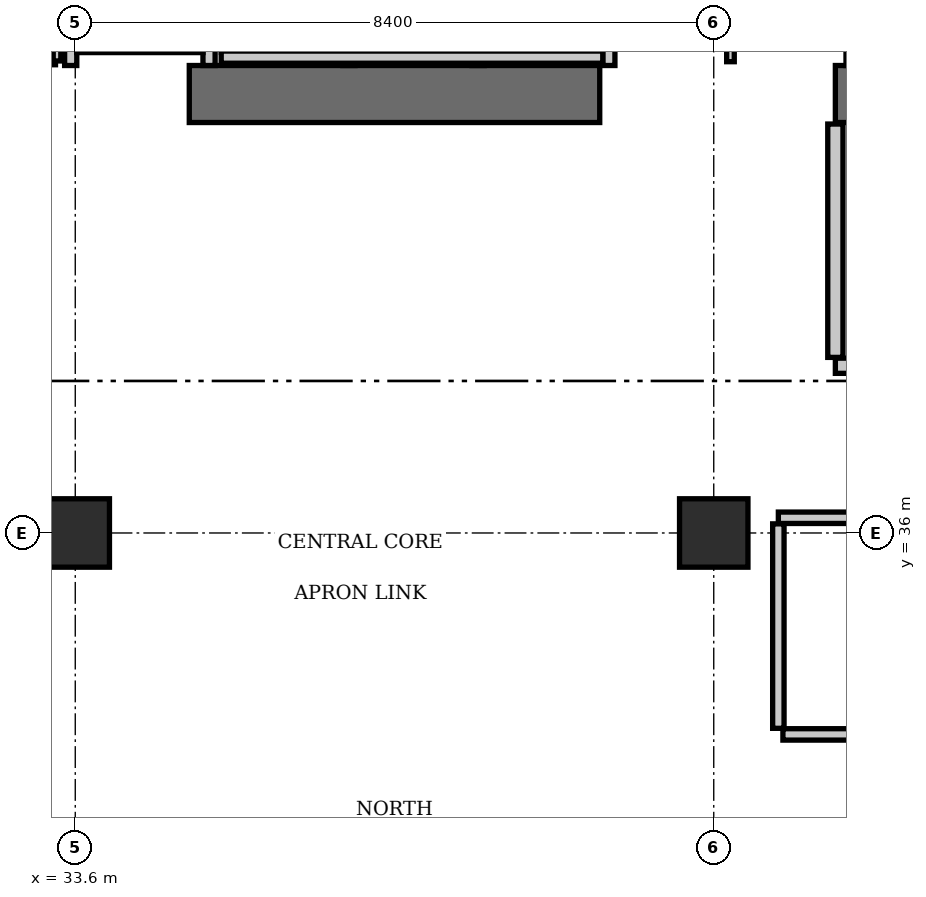
"""IFC4 building model, lengths in metres.
Left out: names, types, materials, properties, quantities, classifications, styles, units other than length and angle.
Written with IfcOpenShell. Run it as: python <this file> out.ifc"""

import sys

from ifc_helpers import new_model, si_unit, direction, frame, frame_2d, origin, origin_2d, place, context, subcontext, project, spatial, rectangle, extrude, element, save


model = new_model("IFC4")
c1 = context("Model", 3, precision=1e-05, world=origin(), true_north=direction((0.0, 1.0)))
c2 = subcontext(c1, "Body", "Model", "MODEL_VIEW")
j1 = project(units=[si_unit("LENGTHUNIT", "METRE"), si_unit("PLANEANGLEUNIT", "RADIAN")], contexts=[c1])
p1 = place(None, origin())
s1 = spatial("IfcSite", under=j1, at=p1, CompositionType="ELEMENT")
p2 = place(p1, origin())
s2 = spatial("IfcBuilding", under=s1, at=p2, CompositionType="ELEMENT")
p3 = place(p2, frame((0.0, 0.0, 165.9)))
s3 = spatial("IfcBuildingStorey", under=s2, at=p3, CompositionType="ELEMENT", Elevation=165.9)
p4 = place(p3, frame((35.1, 41.775, 0.0), z_axis=(0.0, 0.0, 1.0), x_axis=(1.0, 0.0, 0.0)))
e1 = element("IfcWall", 1, at=p4, inside=s3, PredefinedType="SHEAR", context=c2, shape_type="SweptSolid", body=[
    extrude(rectangle(XDim=5.4, YDim=0.75, at=frame_2d((2.7, 0.0))), origin(), (0.0, 0.0, 1.0), 3.85),
])
p5 = place(p3, frame((43.6, 41.775, 0.0), z_axis=(0.0, 0.0, 1.0), x_axis=(1.0, 0.0, 0.0)))
e2 = element("IfcWall", 2, at=p5, inside=s3, PredefinedType="SHEAR", context=c2, shape_type="SweptSolid", body=[
    extrude(rectangle(XDim=6.8, YDim=0.75, at=frame_2d((3.4, 0.0))), origin(), (0.0, 0.0, 1.0), 3.85),
])
p6 = place(p5, frame((3.9, 0.0, 0.0)))
e3 = element("IfcOpeningElement", 3, at=p6, cuts=e2, PredefinedType="OPENING", context=c2, shape_type="SweptSolid", body=[
    extrude(rectangle(XDim=1.15, YDim=2.15, at=frame_2d((0.575, 1.075))), frame((0.0, 0.385, 0.0), z_axis=(0.0, -1.0, 0.0), x_axis=(1.0, 0.0, 0.0)), (0.0, 0.0, 1.0), 0.77),
])
p7 = place(p5, frame((0.55, 0.0, 0.0)))
e4 = element("IfcOpeningElement", 4, at=p7, cuts=e2, PredefinedType="OPENING", context=c2, shape_type="SweptSolid", body=[
    extrude(rectangle(XDim=1.1, YDim=2.2, at=frame_2d((0.55, 1.1))), frame((0.0, 0.385, 0.0), z_axis=(0.0, -1.0, 0.0), x_axis=(1.0, 0.0, 0.0)), (0.0, 0.0, 1.0), 0.77),
])
for number, where, z_axis, x_axis in (
    (5, (33.6, 36.0, 0.0), (0.0, 0.0, 1.0), (1.0, 0.0, 0.0)),
    (6, (42.0, 36.0, 0.0), (0.0, 0.0, 1.0), (1.0, 0.0, 0.0)),
):
    element("IfcColumn", number, at=place(p3, frame(where, z_axis=z_axis, x_axis=x_axis)), inside=s3, PredefinedType="COLUMN", context=c2, shape_type="SweptSolid", body=[
        extrude(rectangle(XDim=0.9, YDim=0.9, at=origin_2d()), origin(), (0.0, 0.0, 1.0), 3.85),
    ])
p8 = place(p3, frame((43.82, 42.15, 0.0), z_axis=(0.0, 0.0, 1.0), x_axis=(0.0, 1.0, 0.0)))
e7 = element("IfcWall", 7, at=p8, inside=s3, PredefinedType="SOLIDWALL", context=c2, shape_type="SweptSolid", body=[
    extrude(rectangle(XDim=2.59, YDim=0.16, at=frame_2d((1.295, 0.0))), origin(), (0.0, 0.0, 1.0), 3.61),
])
for number, where, z_axis, x_axis in (
    (8, (37.2, 42.15, 0.0), (0.0, 0.0, 1.0), (0.0, 1.0, 0.0)),
    (9, (38.9, 42.15, 0.0), (0.0, 0.0, 1.0), (0.0, 1.0, 0.0)),
    (10, (40.62, 42.15, 0.0), (0.0, 0.0, 1.0), (0.0, 1.0, 0.0)),
):
    element("IfcWall", number, at=place(p3, frame(where, z_axis=z_axis, x_axis=x_axis)), inside=s3, PredefinedType="SOLIDWALL", context=c2, shape_type="SweptSolid", body=[
        extrude(rectangle(XDim=2.2, YDim=0.16, at=frame_2d((1.1, 0.0))), origin(), (0.0, 0.0, 1.0), 3.61),
    ])
p9 = place(p3, frame((35.52, 42.26, 0.0), z_axis=(0.0, 0.0, 1.0), x_axis=(1.0, 0.0, 0.0)))
e11 = element("IfcWall", 11, at=p9, inside=s3, PredefinedType="SOLIDWALL", context=c2, shape_type="SweptSolid", body=[
    extrude(rectangle(XDim=5.02, YDim=0.16, at=frame_2d((2.51, 0.0))), origin(), (0.0, 0.0, 1.0), 3.61),
])
for number, where, z_axis, x_axis in (
    (12, (33.54, 42.15, 0.0), (0.0, 0.0, 1.0), (0.0, 1.0, 0.0)),
    (13, (35.36, 42.15, 0.0), (0.0, 0.0, 1.0), (0.0, 1.0, 0.0)),
):
    element("IfcWall", number, at=place(p3, frame(where, z_axis=z_axis, x_axis=x_axis)), inside=s3, PredefinedType="SOLIDWALL", context=c2, shape_type="SweptSolid", body=[
        extrude(rectangle(XDim=2.25, YDim=0.16, at=frame_2d((1.125, 0.0))), origin(), (0.0, 0.0, 1.0), 3.61),
    ])
p10 = place(p3, frame((33.62, 42.4, 0.0), z_axis=(0.0, 0.0, 1.0), x_axis=(1.0, 0.0, 0.0)))
e14 = element("IfcWall", 14, at=p10, inside=s3, PredefinedType="SOLIDWALL", context=c2, shape_type="SweptSolid", body=[
    extrude(rectangle(XDim=1.66, YDim=0.16, at=frame_2d((0.83, 0.0))), origin(), (0.0, 0.0, 1.0), 3.61),
])
p11 = place(p3, frame((43.6, 38.2, 0.0), z_axis=(0.0, 0.0, 1.0), x_axis=(1.0, 0.0, 0.0)))
e15 = element("IfcWall", 15, at=p11, inside=s3, PredefinedType="PARTITIONING", context=c2, shape_type="SweptSolid", body=[
    extrude(rectangle(XDim=5.8, YDim=0.2, at=frame_2d((2.9, 0.0))), origin(), (0.0, 0.0, 1.0), 3.61),
])
p12 = place(p11, frame((2.3, 0.0, 0.0)))
e16 = element("IfcOpeningElement", 16, at=p12, cuts=e15, PredefinedType="OPENING", context=c2, shape_type="SweptSolid", body=[
    extrude(rectangle(XDim=1.15, YDim=2.15, at=frame_2d((0.575, 1.075))), frame((0.0, 0.11, 0.0), z_axis=(0.0, -1.0, 0.0), x_axis=(1.0, 0.0, 0.0)), (0.0, 0.0, 1.0), 0.22),
])
p13 = place(p3, frame((43.6, 38.31, 0.0), z_axis=(0.0, 0.0, 1.0), x_axis=(0.0, 1.0, 0.0)))
e17 = element("IfcWall", 17, at=p13, inside=s3, PredefinedType="PARTITIONING", context=c2, shape_type="SweptSolid", body=[
    extrude(rectangle(XDim=3.07, YDim=0.2, at=frame_2d((1.535, 0.0))), origin(), (0.0, 0.0, 1.0), 3.61),
])
p14 = place(p3, frame((32.02, 42.21, 0.0), z_axis=(0.0, 0.0, 1.0), x_axis=(1.0, 0.0, 0.0)))
e18 = element("IfcWall", 18, at=p14, inside=s3, PredefinedType="PARTITIONING", context=c2, shape_type="SweptSolid", body=[
    extrude(rectangle(XDim=1.32, YDim=0.1, at=frame_2d((0.66, 0.0))), origin(), (0.0, 0.0, 1.0), 3.61),
])
p15 = place(p14, frame((0.24, 0.0, 0.0)))
e19 = element("IfcOpeningElement", 19, at=p15, cuts=e18, PredefinedType="OPENING", context=c2, shape_type="SweptSolid", body=[
    extrude(rectangle(XDim=0.8, YDim=2.05, at=frame_2d((0.4, 1.025))), frame((0.0, 0.06, 0.0), z_axis=(0.0, -1.0, 0.0), x_axis=(1.0, 0.0, 0.0)), (0.0, 0.0, 1.0), 0.12),
])
p16 = place(p3, frame((33.36, 42.21, 0.0), z_axis=(0.0, 0.0, 1.0), x_axis=(0.0, 1.0, 0.0)))
e20 = element("IfcWall", 20, at=p16, inside=s3, PredefinedType="PARTITIONING", context=c2, shape_type="SweptSolid", body=[
    extrude(rectangle(XDim=2.73, YDim=0.1, at=frame_2d((1.365, 0.0))), origin(), (0.0, 0.0, 1.0), 3.61),
])
p17 = place(p3, frame((42.22, 42.2, 0.0), z_axis=(0.0, 0.0, 1.0), x_axis=(0.0, 1.0, 0.0)))
e21 = element("IfcWall", 21, at=p17, inside=s3, PredefinedType="PARTITIONING", context=c2, shape_type="SweptSolid", body=[
    extrude(rectangle(XDim=2.76, YDim=0.1, at=frame_2d((1.38, 0.0))), origin(), (0.0, 0.0, 1.0), 3.61),
])
p18 = place(p17, frame((0.65, 0.0, 0.0)))
e22 = element("IfcOpeningElement", 22, at=p18, cuts=e21, PredefinedType="OPENING", context=c2, shape_type="SweptSolid", body=[
    extrude(rectangle(XDim=0.8, YDim=2.05, at=frame_2d((0.4, 1.025))), frame((0.0, 0.06, 0.0), z_axis=(0.0, -1.0, 0.0), x_axis=(1.0, 0.0, 0.0)), (0.0, 0.0, 1.0), 0.12),
])
p19 = place(p3, frame((42.85, 36.2, 0.0), z_axis=(0.0, 0.0, 1.0), x_axis=(1.0, 0.0, 0.0)))
e23 = element("IfcWall", 23, at=p19, inside=s3, PredefinedType="PARTITIONING", context=c2, shape_type="SweptSolid", body=[
    extrude(rectangle(XDim=4.43, YDim=0.15, at=frame_2d((2.215, 0.0))), origin(), (0.0, 0.0, 1.0), 3.61),
])
p20 = place(p3, frame((42.85, 33.43, 0.0), z_axis=(0.0, 0.0, 1.0), x_axis=(0.0, 1.0, 0.0)))
e24 = element("IfcWall", 24, at=p20, inside=s3, PredefinedType="PARTITIONING", context=c2, shape_type="SweptSolid", body=[
    extrude(rectangle(XDim=2.69, YDim=0.15, at=frame_2d((1.345, 0.0))), origin(), (0.0, 0.0, 1.0), 3.61),
])
p21 = place(p3, frame((42.91, 33.35, 0.0), z_axis=(0.0, 0.0, 1.0), x_axis=(1.0, 0.0, 0.0)))
e25 = element("IfcWall", 25, at=p21, inside=s3, PredefinedType="PARTITIONING", context=c2, shape_type="SweptSolid", body=[
    extrude(rectangle(XDim=4.31, YDim=0.15, at=frame_2d((2.155, 0.0))), origin(), (0.0, 0.0, 1.0), 3.61),
])
p22 = place(p21, frame((1.705, 0.0, 0.0)))
e26 = element("IfcOpeningElement", 26, at=p22, cuts=e25, PredefinedType="OPENING", context=c2, shape_type="SweptSolid", body=[
    extrude(rectangle(XDim=0.9, YDim=2.1, at=frame_2d((0.45, 1.05))), frame((0.0, 0.085, 0.0), z_axis=(0.0, -1.0, 0.0), x_axis=(1.0, 0.0, 0.0)), (0.0, 0.0, 1.0), 0.17),
])
save(model, sys.argv[1])
